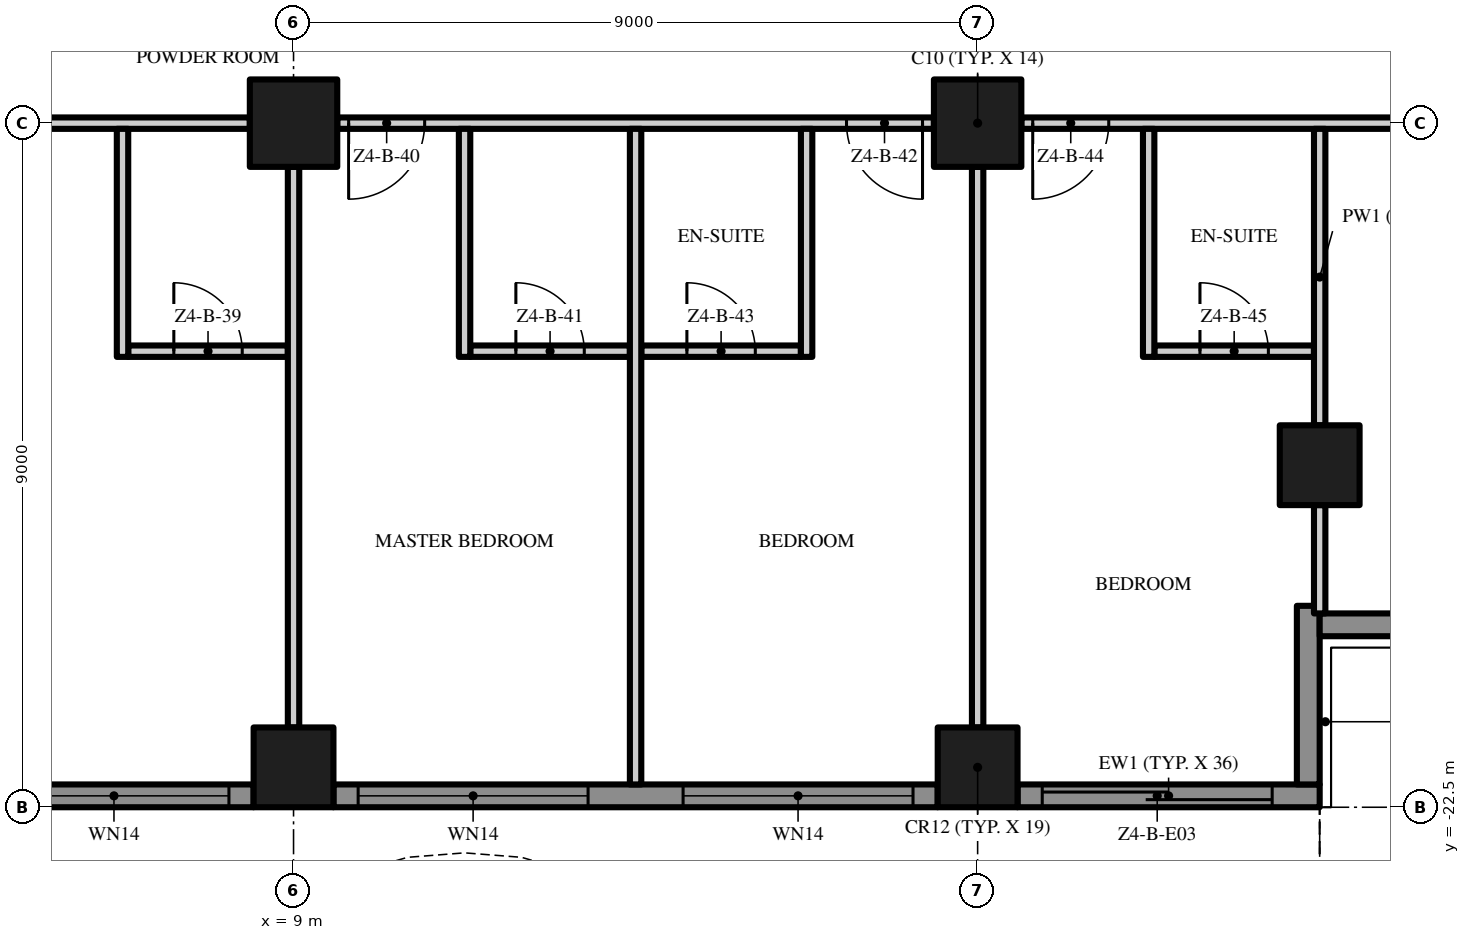
"""IFC4 building model, lengths in metres.
Left out: names, types, materials, properties, quantities, classifications, styles, units other than length and angle.
Written with IfcOpenShell. Run it as: python <this file> out.ifc"""

import sys

from ifc_helpers import new_model, si_unit, direction, frame, frame_2d, origin, origin_2d, place, context, subcontext, project, spatial, polyline, rectangle, outline, extrude, element, fill, save


model = new_model("IFC4")
c1 = context("Model", 3, precision=1e-05, world=origin(), true_north=direction((0.0, 1.0)))
c2 = subcontext(c1, "Body", "Model", "MODEL_VIEW")
j1 = project(units=[si_unit("LENGTHUNIT", "METRE"), si_unit("PLANEANGLEUNIT", "RADIAN")], contexts=[c1])
p1 = place(None, origin())
s1 = spatial("IfcSite", under=j1, at=p1, CompositionType="ELEMENT")
p2 = place(p1, origin())
s2 = spatial("IfcBuilding", under=s1, at=p2, CompositionType="ELEMENT")
p3 = place(p2, frame((0.0, 0.0, 195.8)))
s3 = spatial("IfcBuildingStorey", under=s2, at=p3, CompositionType="ELEMENT", Elevation=195.8)
p4 = place(p3, frame((18.0, -13.5, 0.0), z_axis=(0.0, 0.0, 1.0), x_axis=(1.0, 0.0, 0.0)))
e1 = element("IfcColumn", 1, at=p4, inside=s3, PredefinedType="COLUMN", context=c2, shape_type="SweptSolid", body=[
    extrude(rectangle(XDim=1.15, YDim=1.15, at=origin_2d()), origin(), (0.0, 0.0, 1.0), 3.5),
])
for number, where, z_axis, x_axis in (
    (2, (18.0, -21.975, 0.0), (0.0, 0.0, 1.0), (1.0, 0.0, 0.0)),
    (3, (22.5, -18.0, 0.0), (0.0, 0.0, 1.0), (1.0, 0.0, 0.0)),
):
    element("IfcColumn", number, at=place(p3, frame(where, z_axis=z_axis, x_axis=x_axis)), inside=s3, PredefinedType="COLUMN", context=c2, shape_type="SweptSolid", body=[
        extrude(rectangle(XDim=1.05, YDim=1.05, at=origin_2d()), origin(), (0.0, 0.0, 1.0), 3.5),
    ])
p5 = place(p3, frame((9.0, -13.5, 0.0), z_axis=(0.0, 0.0, 1.0), x_axis=(1.0, 0.0, 0.0)))
e4 = element("IfcColumn", 4, at=p5, inside=s3, PredefinedType="COLUMN", context=c2, shape_type="SweptSolid", body=[
    extrude(rectangle(XDim=1.15, YDim=1.15, at=origin_2d()), origin(), (0.0, 0.0, 1.0), 3.5),
])
p6 = place(p3, frame((9.0, -21.975, 0.0), z_axis=(0.0, 0.0, 1.0), x_axis=(1.0, 0.0, 0.0)))
e5 = element("IfcColumn", 5, at=p6, inside=s3, PredefinedType="COLUMN", context=c2, shape_type="SweptSolid", body=[
    extrude(rectangle(XDim=1.05, YDim=1.05, at=origin_2d()), origin(), (0.0, 0.0, 1.0), 3.5),
])
p7 = place(p3, frame((8.475, -22.35, 0.0), z_axis=(0.0, 0.0, 1.0), x_axis=(-1.0, 0.0, 0.0)))
e6 = element("IfcWall", 6, at=p7, inside=s3, PredefinedType="SOLIDWALL", context=c2, shape_type="SweptSolid", body=[
    extrude(rectangle(XDim=7.95, YDim=0.3, at=frame_2d((3.975, 0.0))), origin(), (0.0, 0.0, 1.0), 3.5),
])
p8 = place(p7, frame((4.6, 0.0, 0.0)))
e7 = element("IfcOpeningElement", 7, at=p8, cuts=e6, PredefinedType="OPENING", context=c2, shape_type="SweptSolid", body=[
    extrude(rectangle(XDim=3.025, YDim=2.4, at=frame_2d((1.512, 1.2))), frame((0.0, 0.16, 0.0), z_axis=(0.0, -1.0, 0.0), x_axis=(1.0, 0.0, 0.0)), (0.0, 0.0, 1.0), 0.32),
])
p9 = place(p7, frame((0.325, 0.0, 0.45)))
e8 = element("IfcOpeningElement", 8, at=p9, cuts=e6, PredefinedType="OPENING", context=c2, shape_type="SweptSolid", body=[
    extrude(rectangle(XDim=3.025, YDim=2.65, at=frame_2d((1.512, 1.325))), frame((0.0, 0.16, 0.0), z_axis=(0.0, -1.0, 0.0), x_axis=(1.0, 0.0, 0.0)), (0.0, 0.0, 1.0), 0.32),
])
p10 = place(p3, frame((17.475, -22.35, 0.0), z_axis=(0.0, 0.0, 1.0), x_axis=(-1.0, 0.0, 0.0)))
e9 = element("IfcWall", 9, at=p10, inside=s3, PredefinedType="SOLIDWALL", context=c2, shape_type="SweptSolid", body=[
    extrude(rectangle(XDim=7.95, YDim=0.3, at=frame_2d((3.975, 0.0))), origin(), (0.0, 0.0, 1.0), 3.5),
])
p11 = place(p10, frame((4.6, 0.0, 0.45)))
e10 = element("IfcOpeningElement", 10, at=p11, cuts=e9, PredefinedType="OPENING", context=c2, shape_type="SweptSolid", body=[
    extrude(rectangle(XDim=3.025, YDim=2.65, at=frame_2d((1.512, 1.325))), frame((0.0, 0.16, 0.0), z_axis=(0.0, -1.0, 0.0), x_axis=(1.0, 0.0, 0.0)), (0.0, 0.0, 1.0), 0.32),
])
p12 = place(p10, frame((0.325, 0.0, 0.45)))
e11 = element("IfcOpeningElement", 11, at=p12, cuts=e9, PredefinedType="OPENING", context=c2, shape_type="SweptSolid", body=[
    extrude(rectangle(XDim=3.025, YDim=2.65, at=frame_2d((1.512, 1.325))), frame((0.0, 0.16, 0.0), z_axis=(0.0, -1.0, 0.0), x_axis=(1.0, 0.0, 0.0)), (0.0, 0.0, 1.0), 0.32),
])
p13 = place(p3, frame((22.5, -22.35, 0.0), z_axis=(0.0, 0.0, 1.0), x_axis=(-1.0, 0.0, 0.0)))
e12 = element("IfcWall", 12, at=p13, inside=s3, PredefinedType="SOLIDWALL", context=c2, shape_type="SweptSolid", body=[
    extrude(rectangle(XDim=3.975, YDim=0.3, at=frame_2d((1.988, 0.0))), origin(), (0.0, 0.0, 1.0), 3.5),
])
p14 = place(p13, frame((0.625, 0.0, 0.0)))
e13 = element("IfcOpeningElement", 13, at=p14, cuts=e12, PredefinedType="OPENING", context=c2, shape_type="SweptSolid", body=[
    extrude(rectangle(XDim=3.025, YDim=2.4, at=frame_2d((1.512, 1.2))), frame((0.0, 0.16, 0.0), z_axis=(0.0, -1.0, 0.0), x_axis=(1.0, 0.0, 0.0)), (0.0, 0.0, 1.0), 0.32),
])
p15 = place(p3, frame((22.35, -19.85, 0.0), z_axis=(0.0, 0.0, 1.0), x_axis=(0.0, -1.0, 0.0)))
e14 = element("IfcWall", 14, at=p15, inside=s3, PredefinedType="SOLIDWALL", context=c2, shape_type="SweptSolid", body=[
    extrude(rectangle(XDim=2.35, YDim=0.3, at=frame_2d((1.175, 0.0))), origin(), (0.0, 0.0, 1.0), 3.5),
])
p16 = place(p3, frame((24.75, -20.1, 0.0), z_axis=(0.0, 0.0, 1.0), x_axis=(-1.0, 0.0, 0.0)))
e15 = element("IfcWall", 15, at=p16, inside=s3, PredefinedType="SOLIDWALL", context=c2, shape_type="SweptSolid", body=[
    extrude(rectangle(XDim=2.25, YDim=0.3, at=frame_2d((1.125, 0.0))), origin(), (0.0, 0.0, 1.0), 3.5),
])
p17 = place(p3, origin())
e16 = element("IfcWall", 16, at=p17, inside=s3, PredefinedType="USERDEFINED", context=c2, shape_type="SweptSolid", body=[
    extrude(outline(polyline([(-22.5, -24.3), (-21.0, -23.595), (-19.5, -23.159), (-18.75, -23.1), (-18.0, -23.159), (-16.5, -23.595), (-15.0, -24.3), (-13.5, -25.005), (-12.0, -25.441), (-11.25, -25.5), (-10.5, -25.441), (-9.0, -25.005), (-7.5, -24.3), (-6.0, -23.595), (-4.5, -23.159), (-3.75, -23.1), (-3.0, -23.159), (-1.5, -23.595), (0.0, -24.3), (1.5, -25.005), (3.0, -25.441), (3.75, -25.5), (4.5, -25.441), (6.0, -25.005), (7.5, -24.3), (9.0, -23.595), (10.5, -23.159), (11.25, -23.1), (12.0, -23.159), (13.5, -23.595), (15.0, -24.3), (16.5, -25.005), (18.0, -25.441), (18.75, -25.5), (19.5, -25.441), (21.0, -25.005), (22.5, -24.3), (22.394, -24.074), (20.911, -24.771), (19.455, -25.194), (18.75, -25.249), (18.045, -25.194), (16.589, -24.771), (15.106, -24.074), (13.589, -23.36), (12.045, -22.911), (11.25, -22.849), (10.455, -22.911), (8.911, -23.36), (7.394, -24.074), (5.911, -24.771), (4.455, -25.194), (3.75, -25.249), (3.045, -25.194), (1.589, -24.771), (0.106, -24.074), (-1.411, -23.36), (-2.955, -22.911), (-3.75, -22.849), (-4.545, -22.911), (-6.089, -23.36), (-7.606, -24.074), (-9.089, -24.771), (-10.545, -25.194), (-11.25, -25.249), (-11.955, -25.194), (-13.411, -24.771), (-14.894, -24.074), (-16.411, -23.36), (-17.955, -22.911), (-18.75, -22.849), (-19.545, -22.911), (-21.089, -23.36), (-22.606, -24.074), (-22.5, -24.3)])), origin(), (0.0, 0.0, 1.0), 0.9),
])
p18 = place(p3, frame((6.825, -16.5, 0.0), z_axis=(0.0, 0.0, 1.0), x_axis=(1.0, 0.0, 0.0)))
e17 = element("IfcWall", 17, at=p18, inside=s3, PredefinedType="PARTITIONING", context=c2, shape_type="SweptSolid", body=[
    extrude(rectangle(XDim=2.1, YDim=0.15, at=frame_2d((1.05, 0.0))), origin(), (0.0, 0.0, 1.0), 3.5),
])
p19 = place(p18, frame((0.6, 0.0, 0.0)))
e18 = element("IfcOpeningElement", 18, at=p19, cuts=e17, PredefinedType="OPENING", context=c2, shape_type="SweptSolid", body=[
    extrude(rectangle(XDim=0.9, YDim=2.1, at=frame_2d((0.45, 1.05))), frame((0.0, 0.085, 0.0), z_axis=(0.0, -1.0, 0.0), x_axis=(1.0, 0.0, 0.0)), (0.0, 0.0, 1.0), 0.17),
])
p20 = place(p3, frame((11.325, -16.5, 0.0), z_axis=(0.0, 0.0, 1.0), x_axis=(1.0, 0.0, 0.0)))
e19 = element("IfcWall", 19, at=p20, inside=s3, PredefinedType="PARTITIONING", context=c2, shape_type="SweptSolid", body=[
    extrude(rectangle(XDim=2.1, YDim=0.15, at=frame_2d((1.05, 0.0))), origin(), (0.0, 0.0, 1.0), 3.5),
])
p21 = place(p20, frame((0.6, 0.0, 0.0)))
e20 = element("IfcOpeningElement", 20, at=p21, cuts=e19, PredefinedType="OPENING", context=c2, shape_type="SweptSolid", body=[
    extrude(rectangle(XDim=0.9, YDim=2.1, at=frame_2d((0.45, 1.05))), frame((0.0, 0.085, 0.0), z_axis=(0.0, -1.0, 0.0), x_axis=(1.0, 0.0, 0.0)), (0.0, 0.0, 1.0), 0.17),
])
p22 = place(p3, frame((13.575, -16.5, 0.0), z_axis=(0.0, 0.0, 1.0), x_axis=(1.0, 0.0, 0.0)))
e21 = element("IfcWall", 21, at=p22, inside=s3, PredefinedType="PARTITIONING", context=c2, shape_type="SweptSolid", body=[
    extrude(rectangle(XDim=2.1, YDim=0.15, at=frame_2d((1.05, 0.0))), origin(), (0.0, 0.0, 1.0), 3.5),
])
p23 = place(p22, frame((0.6, 0.0, 0.0)))
e22 = element("IfcOpeningElement", 22, at=p23, cuts=e21, PredefinedType="OPENING", context=c2, shape_type="SweptSolid", body=[
    extrude(rectangle(XDim=0.9, YDim=2.1, at=frame_2d((0.45, 1.05))), frame((0.0, 0.085, 0.0), z_axis=(0.0, -1.0, 0.0), x_axis=(1.0, 0.0, 0.0)), (0.0, 0.0, 1.0), 0.17),
])
p24 = place(p3, frame((20.325, -16.5, 0.0), z_axis=(0.0, 0.0, 1.0), x_axis=(1.0, 0.0, 0.0)))
e23 = element("IfcWall", 23, at=p24, inside=s3, PredefinedType="PARTITIONING", context=c2, shape_type="SweptSolid", body=[
    extrude(rectangle(XDim=2.1, YDim=0.15, at=frame_2d((1.05, 0.0))), origin(), (0.0, 0.0, 1.0), 3.5),
])
p25 = place(p24, frame((0.6, 0.0, 0.0)))
e24 = element("IfcOpeningElement", 24, at=p25, cuts=e23, PredefinedType="OPENING", context=c2, shape_type="SweptSolid", body=[
    extrude(rectangle(XDim=0.9, YDim=2.1, at=frame_2d((0.45, 1.05))), frame((0.0, 0.085, 0.0), z_axis=(0.0, -1.0, 0.0), x_axis=(1.0, 0.0, 0.0)), (0.0, 0.0, 1.0), 0.17),
])
p26 = place(p3, frame((8.425, -13.5, 0.0), z_axis=(0.0, 0.0, 1.0), x_axis=(-1.0, 0.0, 0.0)))
e25 = element("IfcWall", 25, at=p26, inside=s3, PredefinedType="PARTITIONING", context=c2, shape_type="SweptSolid", body=[
    extrude(rectangle(XDim=7.85, YDim=0.15, at=frame_2d((3.925, 0.0))), origin(), (0.0, 0.0, 1.0), 3.5),
])
p27 = place(p26, frame((4.15, 0.0, 0.0)))
e26 = element("IfcOpeningElement", 26, at=p27, cuts=e25, PredefinedType="OPENING", context=c2, shape_type="SweptSolid", body=[
    extrude(rectangle(XDim=1.8, YDim=2.4, at=frame_2d((0.9, 1.2))), frame((0.0, 0.085, 0.0), z_axis=(0.0, -1.0, 0.0), x_axis=(1.0, 0.0, 0.0)), (0.0, 0.0, 1.0), 0.17),
])
p28 = place(p3, frame((17.425, -13.5, 0.0), z_axis=(0.0, 0.0, 1.0), x_axis=(-1.0, 0.0, 0.0)))
e27 = element("IfcWall", 27, at=p28, inside=s3, PredefinedType="PARTITIONING", context=c2, shape_type="SweptSolid", body=[
    extrude(rectangle(XDim=7.85, YDim=0.15, at=frame_2d((3.925, 0.0))), origin(), (0.0, 0.0, 1.0), 3.5),
])
p29 = place(p28, frame((6.7, 0.0, 0.0)))
e28 = element("IfcOpeningElement", 28, at=p29, cuts=e27, PredefinedType="OPENING", context=c2, shape_type="SweptSolid", body=[
    extrude(rectangle(XDim=1.0, YDim=2.4, at=frame_2d((0.5, 1.2))), frame((0.0, 0.085, 0.0), z_axis=(0.0, -1.0, 0.0), x_axis=(1.0, 0.0, 0.0)), (0.0, 0.0, 1.0), 0.17),
])
p30 = place(p28, frame((0.15, 0.0, 0.0)))
e29 = element("IfcOpeningElement", 29, at=p30, cuts=e27, PredefinedType="OPENING", context=c2, shape_type="SweptSolid", body=[
    extrude(rectangle(XDim=1.0, YDim=2.4, at=frame_2d((0.5, 1.2))), frame((0.0, 0.085, 0.0), z_axis=(0.0, -1.0, 0.0), x_axis=(1.0, 0.0, 0.0)), (0.0, 0.0, 1.0), 0.17),
])
p31 = place(p3, frame((25.95, -13.5, 0.0), z_axis=(0.0, 0.0, 1.0), x_axis=(-1.0, 0.0, 0.0)))
e30 = element("IfcWall", 30, at=p31, inside=s3, PredefinedType="PARTITIONING", context=c2, shape_type="SweptSolid", body=[
    extrude(rectangle(XDim=7.375, YDim=0.15, at=frame_2d((3.688, 0.0))), origin(), (0.0, 0.0, 1.0), 3.5),
])
p32 = place(p31, frame((6.225, 0.0, 0.0)))
e31 = element("IfcOpeningElement", 31, at=p32, cuts=e30, PredefinedType="OPENING", context=c2, shape_type="SweptSolid", body=[
    extrude(rectangle(XDim=1.0, YDim=2.4, at=frame_2d((0.5, 1.2))), frame((0.0, 0.085, 0.0), z_axis=(0.0, -1.0, 0.0), x_axis=(1.0, 0.0, 0.0)), (0.0, 0.0, 1.0), 0.17),
])
p33 = place(p31, frame((0.7, 0.0, 0.0)))
e32 = element("IfcOpeningElement", 32, at=p33, cuts=e30, PredefinedType="OPENING", context=c2, shape_type="SweptSolid", body=[
    extrude(rectangle(XDim=1.0, YDim=2.4, at=frame_2d((0.5, 1.2))), frame((0.0, 0.085, 0.0), z_axis=(0.0, -1.0, 0.0), x_axis=(1.0, 0.0, 0.0)), (0.0, 0.0, 1.0), 0.17),
])
p34 = place(p3, frame((6.75, -16.575, 0.0), z_axis=(0.0, 0.0, 1.0), x_axis=(0.0, 1.0, 0.0)))
e33 = element("IfcWall", 33, at=p34, inside=s3, PredefinedType="PARTITIONING", context=c2, shape_type="SweptSolid", body=[
    extrude(rectangle(XDim=3.0, YDim=0.15, at=frame_2d((1.5, 0.0))), origin(), (0.0, 0.0, 1.0), 3.5),
])
p35 = place(p3, frame((9.0, -21.45, 0.0), z_axis=(0.0, 0.0, 1.0), x_axis=(0.0, 1.0, 0.0)))
e34 = element("IfcWall", 34, at=p35, inside=s3, PredefinedType="PARTITIONING", context=c2, shape_type="SweptSolid", body=[
    extrude(rectangle(XDim=7.375, YDim=0.15, at=frame_2d((3.688, 0.0))), origin(), (0.0, 0.0, 1.0), 3.5),
])
p36 = place(p3, frame((11.25, -16.575, 0.0), z_axis=(0.0, 0.0, 1.0), x_axis=(0.0, 1.0, 0.0)))
e35 = element("IfcWall", 35, at=p36, inside=s3, PredefinedType="PARTITIONING", context=c2, shape_type="SweptSolid", body=[
    extrude(rectangle(XDim=3.0, YDim=0.15, at=frame_2d((1.5, 0.0))), origin(), (0.0, 0.0, 1.0), 3.5),
])
p37 = place(p3, frame((13.5, -22.2, 0.0), z_axis=(0.0, 0.0, 1.0), x_axis=(0.0, 1.0, 0.0)))
e36 = element("IfcWall", 36, at=p37, inside=s3, PredefinedType="PARTITIONING", context=c2, shape_type="SweptSolid", body=[
    extrude(rectangle(XDim=8.625, YDim=0.15, at=frame_2d((4.312, 0.0))), origin(), (0.0, 0.0, 1.0), 3.5),
])
p38 = place(p3, frame((15.75, -16.575, 0.0), z_axis=(0.0, 0.0, 1.0), x_axis=(0.0, 1.0, 0.0)))
e37 = element("IfcWall", 37, at=p38, inside=s3, PredefinedType="PARTITIONING", context=c2, shape_type="SweptSolid", body=[
    extrude(rectangle(XDim=3.0, YDim=0.15, at=frame_2d((1.5, 0.0))), origin(), (0.0, 0.0, 1.0), 3.5),
])
p39 = place(p3, frame((18.0, -21.45, 0.0), z_axis=(0.0, 0.0, 1.0), x_axis=(0.0, 1.0, 0.0)))
e38 = element("IfcWall", 38, at=p39, inside=s3, PredefinedType="PARTITIONING", context=c2, shape_type="SweptSolid", body=[
    extrude(rectangle(XDim=7.375, YDim=0.15, at=frame_2d((3.688, 0.0))), origin(), (0.0, 0.0, 1.0), 3.5),
])
p40 = place(p3, frame((20.25, -16.575, 0.0), z_axis=(0.0, 0.0, 1.0), x_axis=(0.0, 1.0, 0.0)))
e39 = element("IfcWall", 39, at=p40, inside=s3, PredefinedType="PARTITIONING", context=c2, shape_type="SweptSolid", body=[
    extrude(rectangle(XDim=3.0, YDim=0.15, at=frame_2d((1.5, 0.0))), origin(), (0.0, 0.0, 1.0), 3.5),
])
p41 = place(p3, frame((22.5, -19.95, 0.0), z_axis=(0.0, 0.0, 1.0), x_axis=(0.0, 1.0, 0.0)))
e40 = element("IfcWall", 40, at=p41, inside=s3, PredefinedType="PARTITIONING", context=c2, shape_type="SweptSolid", body=[
    extrude(rectangle(XDim=1.425, YDim=0.15, at=frame_2d((0.713, 0.0))), origin(), (0.0, 0.0, 1.0), 3.5),
])
p42 = place(p3, frame((22.5, -17.475, 0.0), z_axis=(0.0, 0.0, 1.0), x_axis=(0.0, 1.0, 0.0)))
e41 = element("IfcWall", 41, at=p42, inside=s3, PredefinedType="PARTITIONING", context=c2, shape_type="SweptSolid", body=[
    extrude(rectangle(XDim=3.9, YDim=0.15, at=frame_2d((1.95, 0.0))), origin(), (0.0, 0.0, 1.0), 3.5),
])
p43 = place(p9, origin())
e42 = element("IfcWindow", 42, at=p43, inside=s3, PartitioningType="SINGLE_PANEL", PredefinedType="WINDOW", context=c2, shape_type="SweptSolid", body=[
    extrude(rectangle(XDim=3.025, YDim=2.65, at=frame_2d((1.512, 1.325))), frame((0.0, 0.03, 0.0), z_axis=(0.0, -1.0, 0.0), x_axis=(1.0, 0.0, 0.0)), (0.0, 0.0, 1.0), 0.06),
])
fill(e8, e42)
p44 = place(p11, origin())
e43 = element("IfcWindow", 43, at=p44, inside=s3, PartitioningType="SINGLE_PANEL", PredefinedType="WINDOW", context=c2, shape_type="SweptSolid", body=[
    extrude(rectangle(XDim=3.025, YDim=2.65, at=frame_2d((1.512, 1.325))), frame((0.0, 0.03, 0.0), z_axis=(0.0, -1.0, 0.0), x_axis=(1.0, 0.0, 0.0)), (0.0, 0.0, 1.0), 0.06),
])
fill(e10, e43)
p45 = place(p12, origin())
e44 = element("IfcWindow", 44, at=p45, inside=s3, PartitioningType="SINGLE_PANEL", PredefinedType="WINDOW", context=c2, shape_type="SweptSolid", body=[
    extrude(rectangle(XDim=3.025, YDim=2.65, at=frame_2d((1.512, 1.325))), frame((0.0, 0.03, 0.0), z_axis=(0.0, -1.0, 0.0), x_axis=(1.0, 0.0, 0.0)), (0.0, 0.0, 1.0), 0.06),
])
fill(e11, e44)
p46 = place(p14, origin())
e45 = element("IfcDoor", 45, at=p46, inside=s3, OperationType="SINGLE_SWING_LEFT", PredefinedType="DOOR", context=c2, shape_type="SweptSolid", body=[
    extrude(rectangle(XDim=3.025, YDim=2.4, at=frame_2d((1.512, 1.2))), frame((0.0, 0.025, 0.0), z_axis=(0.0, -1.0, 0.0), x_axis=(1.0, 0.0, 0.0)), (0.0, 0.0, 1.0), 0.05),
])
fill(e13, e45)
p47 = place(p19, origin())
e46 = element("IfcDoor", 46, at=p47, inside=s3, OperationType="SINGLE_SWING_LEFT", PredefinedType="DOOR", context=c2, shape_type="SweptSolid", body=[
    extrude(rectangle(XDim=0.9, YDim=2.1, at=frame_2d((0.45, 1.05))), frame((0.0, 0.025, 0.0), z_axis=(0.0, -1.0, 0.0), x_axis=(1.0, 0.0, 0.0)), (0.0, 0.0, 1.0), 0.05),
])
fill(e18, e46)
p48 = place(p29, origin())
e47 = element("IfcDoor", 47, at=p48, inside=s3, OperationType="SINGLE_SWING_RIGHT", PredefinedType="DOOR", context=c2, shape_type="SweptSolid", body=[
    extrude(rectangle(XDim=1.0, YDim=2.4, at=frame_2d((0.5, 1.2))), frame((0.0, 0.025, 0.0), z_axis=(0.0, -1.0, 0.0), x_axis=(1.0, 0.0, 0.0)), (0.0, 0.0, 1.0), 0.05),
])
fill(e28, e47)
p49 = place(p21, origin())
e48 = element("IfcDoor", 48, at=p49, inside=s3, OperationType="SINGLE_SWING_LEFT", PredefinedType="DOOR", context=c2, shape_type="SweptSolid", body=[
    extrude(rectangle(XDim=0.9, YDim=2.1, at=frame_2d((0.45, 1.05))), frame((0.0, 0.025, 0.0), z_axis=(0.0, -1.0, 0.0), x_axis=(1.0, 0.0, 0.0)), (0.0, 0.0, 1.0), 0.05),
])
fill(e20, e48)
p50 = place(p30, origin())
e49 = element("IfcDoor", 49, at=p50, inside=s3, OperationType="SINGLE_SWING_LEFT", PredefinedType="DOOR", context=c2, shape_type="SweptSolid", body=[
    extrude(rectangle(XDim=1.0, YDim=2.4, at=frame_2d((0.5, 1.2))), frame((0.0, 0.025, 0.0), z_axis=(0.0, -1.0, 0.0), x_axis=(1.0, 0.0, 0.0)), (0.0, 0.0, 1.0), 0.05),
])
fill(e29, e49)
p51 = place(p23, origin())
e50 = element("IfcDoor", 50, at=p51, inside=s3, OperationType="SINGLE_SWING_LEFT", PredefinedType="DOOR", context=c2, shape_type="SweptSolid", body=[
    extrude(rectangle(XDim=0.9, YDim=2.1, at=frame_2d((0.45, 1.05))), frame((0.0, 0.025, 0.0), z_axis=(0.0, -1.0, 0.0), x_axis=(1.0, 0.0, 0.0)), (0.0, 0.0, 1.0), 0.05),
])
fill(e22, e50)
p52 = place(p32, origin())
e51 = element("IfcDoor", 51, at=p52, inside=s3, OperationType="SINGLE_SWING_RIGHT", PredefinedType="DOOR", context=c2, shape_type="SweptSolid", body=[
    extrude(rectangle(XDim=1.0, YDim=2.4, at=frame_2d((0.5, 1.2))), frame((0.0, 0.025, 0.0), z_axis=(0.0, -1.0, 0.0), x_axis=(1.0, 0.0, 0.0)), (0.0, 0.0, 1.0), 0.05),
])
fill(e31, e51)
p53 = place(p25, origin())
e52 = element("IfcDoor", 52, at=p53, inside=s3, OperationType="SINGLE_SWING_LEFT", PredefinedType="DOOR", context=c2, shape_type="SweptSolid", body=[
    extrude(rectangle(XDim=0.9, YDim=2.1, at=frame_2d((0.45, 1.05))), frame((0.0, 0.025, 0.0), z_axis=(0.0, -1.0, 0.0), x_axis=(1.0, 0.0, 0.0)), (0.0, 0.0, 1.0), 0.05),
])
fill(e24, e52)
save(model, sys.argv[1])
